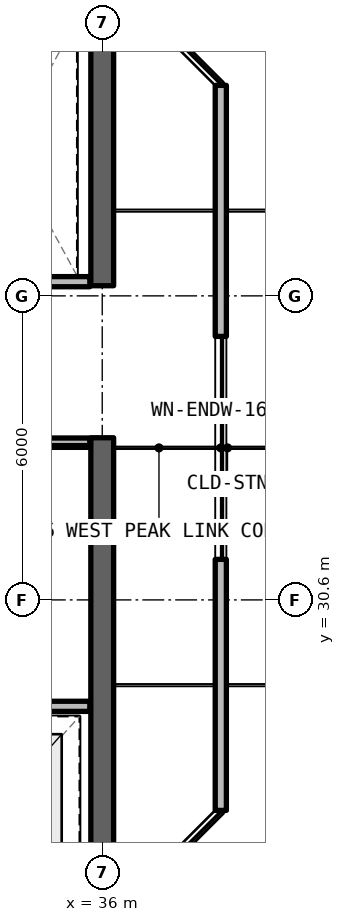
"""IFC4 building model, lengths in metres.
Left out: names, types, materials, properties, quantities, classifications, styles, units other than length and angle.
Written with IfcOpenShell. Run it as: python <this file> out.ifc"""

import sys

from ifc_helpers import new_model, si_unit, direction, frame, frame_2d, origin, place, context, subcontext, project, spatial, rectangle, extrude, element, fill, save


model = new_model("IFC4")
c1 = context("Model", 3, precision=1e-05, world=origin(), true_north=direction((0.0, 1.0)))
c2 = subcontext(c1, "Body", "Model", "MODEL_VIEW")
j1 = project(units=[si_unit("LENGTHUNIT", "METRE"), si_unit("PLANEANGLEUNIT", "RADIAN")], contexts=[c1])
p1 = place(None, origin())
s1 = spatial("IfcSite", under=j1, at=p1, CompositionType="ELEMENT")
p2 = place(p1, origin())
s2 = spatial("IfcBuilding", under=s1, at=p2, CompositionType="ELEMENT")
p3 = place(p2, frame((0.0, 0.0, 242.55)))
s3 = spatial("IfcBuildingStorey", under=s2, at=p3, CompositionType="ELEMENT", Elevation=242.55)
p4 = place(p3, frame((36.0, 24.825, 0.0), z_axis=(0.0, 0.0, 1.0), x_axis=(0.0, 1.0, 0.0)))
e1 = element("IfcWall", 1, at=p4, inside=s3, PredefinedType="SHEAR", context=c2, shape_type="SweptSolid", body=[
    extrude(rectangle(XDim=8.975, YDim=0.45, at=frame_2d((4.488, 0.0))), origin(), (0.0, 0.0, 1.0), 3.63),
])
p5 = place(p3, frame((36.0, 36.8, 0.0), z_axis=(0.0, 0.0, 1.0), x_axis=(0.0, 1.0, 0.0)))
e2 = element("IfcWall", 2, at=p5, inside=s3, PredefinedType="SHEAR", context=c2, shape_type="SweptSolid", body=[
    extrude(rectangle(XDim=5.575, YDim=0.45, at=frame_2d((2.788, 0.0))), origin(), (0.0, 0.0, 1.0), 3.63),
])
p6 = place(p3, frame((38.34, 26.446, 0.0), z_axis=(0.0, 0.0, 1.0), x_axis=(0.0, 1.0, 0.0)))
e3 = element("IfcWall", 3, at=p6, inside=s3, PredefinedType="SOLIDWALL", context=c2, shape_type="SweptSolid", body=[
    extrude(rectangle(XDim=14.309, YDim=0.22, at=frame_2d((7.154, 0.0))), origin(), (0.0, 0.0, 1.0), 3.41),
])
p7 = place(p6, frame((4.954, 0.0, 0.78)))
e4 = element("IfcOpeningElement", 4, at=p7, cuts=e3, PredefinedType="OPENING", context=c2, shape_type="SweptSolid", body=[
    extrude(rectangle(XDim=4.4, YDim=1.66, at=frame_2d((2.2, 0.83))), frame((0.0, 0.12, 0.0), z_axis=(0.0, -1.0, 0.0), x_axis=(1.0, 0.0, 0.0)), (0.0, 0.0, 1.0), 0.24),
])
p8 = place(p3, frame((28.17, 28.5, 0.0), z_axis=(0.0, 0.0, 1.0), x_axis=(1.0, 0.0, 0.0)))
e5 = element("IfcWall", 5, at=p8, inside=s3, PredefinedType="SOLIDWALL", context=c2, shape_type="SweptSolid", body=[
    extrude(rectangle(XDim=7.585, YDim=0.2, at=frame_2d((3.792, 0.0))), origin(), (0.0, 0.0, 1.0), 2.63),
])
p9 = place(p8, frame((3.03, 0.0, 0.0)))
e6 = element("IfcOpeningElement", 6, at=p9, cuts=e5, PredefinedType="OPENING", context=c2, shape_type="SweptSolid", body=[
    extrude(rectangle(XDim=1.0, YDim=2.15, at=frame_2d((0.5, 1.075))), frame((0.0, 0.11, 0.0), z_axis=(0.0, -1.0, 0.0), x_axis=(1.0, 0.0, 0.0)), (0.0, 0.0, 1.0), 0.22),
])
p10 = place(p3, frame((32.68, 33.72, 0.0), z_axis=(0.0, 0.0, 1.0), x_axis=(1.0, 0.0, 0.0)))
e7 = element("IfcWall", 7, at=p10, inside=s3, PredefinedType="SOLIDWALL", context=c2, shape_type="SweptSolid", body=[
    extrude(rectangle(XDim=3.075, YDim=0.15, at=frame_2d((1.538, 0.0))), origin(), (0.0, 0.0, 1.0), 2.63),
])
p11 = place(p3, frame((32.68, 36.88, 0.0), z_axis=(0.0, 0.0, 1.0), x_axis=(1.0, 0.0, 0.0)))
e8 = element("IfcWall", 8, at=p11, inside=s3, PredefinedType="SOLIDWALL", context=c2, shape_type="SweptSolid", body=[
    extrude(rectangle(XDim=3.075, YDim=0.2, at=frame_2d((1.538, 0.0))), origin(), (0.0, 0.0, 1.0), 2.63),
])
p12 = place(p7, origin())
e9 = element("IfcWindow", 9, at=p12, inside=s3, PartitioningType="SINGLE_PANEL", PredefinedType="WINDOW", context=c2, shape_type="SweptSolid", body=[
    extrude(rectangle(XDim=4.4, YDim=1.66, at=frame_2d((2.2, 0.83))), frame((0.0, 0.03, 0.0), z_axis=(0.0, -1.0, 0.0), x_axis=(1.0, 0.0, 0.0)), (0.0, 0.0, 1.0), 0.06),
])
fill(e4, e9)
save(model, sys.argv[1])
